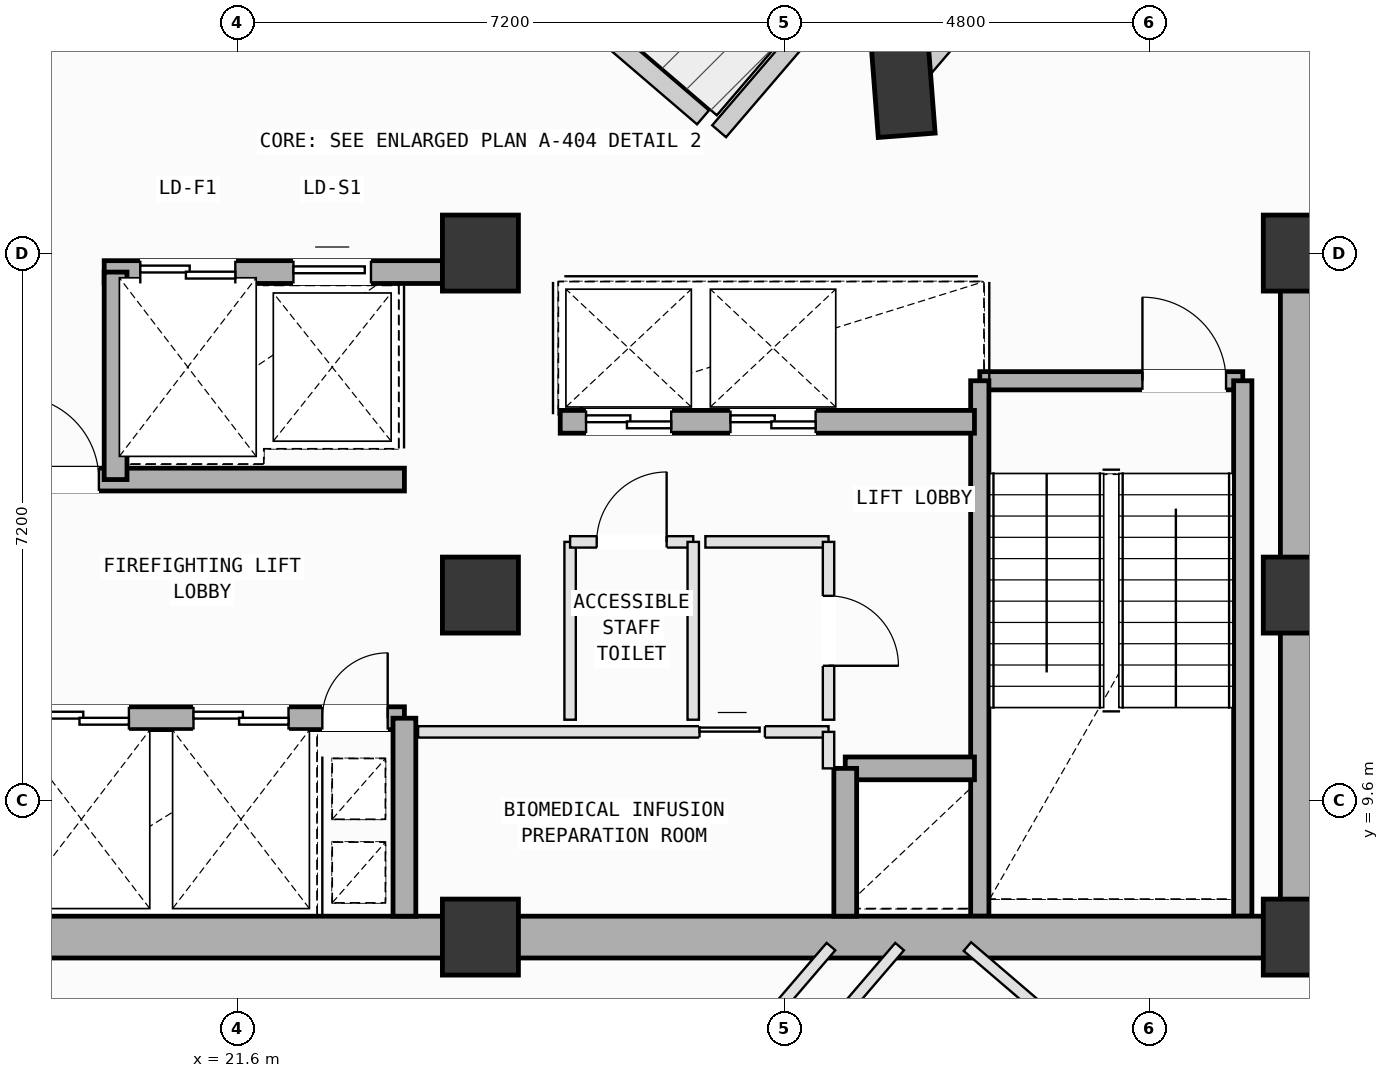
"""IFC4 building model, lengths in metres.
Left out: names, types, materials, properties, quantities, classifications, styles, units other than length and angle.
Written with IfcOpenShell. Run it as: python <this file> out.ifc"""

import sys

from ifc_helpers import new_model, si_unit, direction, frame, frame_2d, origin, origin_2d, place, context, subcontext, project, spatial, rectangle, extrude, element, fill, save


model = new_model("IFC4")
c1 = context("Model", 3, precision=1e-05, world=origin(), true_north=direction((0.0, 1.0)))
c2 = subcontext(c1, "Body", "Model", "MODEL_VIEW")
j1 = project(units=[si_unit("LENGTHUNIT", "METRE"), si_unit("PLANEANGLEUNIT", "RADIAN")], contexts=[c1])
p1 = place(None, origin())
s1 = spatial("IfcSite", under=j1, at=p1, CompositionType="ELEMENT")
p2 = place(p1, origin())
s2 = spatial("IfcBuilding", under=s1, at=p2, CompositionType="ELEMENT")
p3 = place(p2, frame((0.0, 0.0, 235.2)))
s3 = spatial("IfcBuildingStorey", under=s2, at=p3, CompositionType="ELEMENT", Elevation=235.2)
for number, where, z_axis, x_axis in (
    (1, (24.8, 7.8, 0.0), (0.0, 0.0, 1.0), (1.0, 0.0, 0.0)),
    (2, (24.8, 12.3, 0.0), (0.0, 0.0, 1.0), (1.0, 0.0, 0.0)),
    (3, (24.8, 16.8, 0.0), (0.0, 0.0, 1.0), (1.0, 0.0, 0.0)),
    (4, (35.6, 7.8, 0.0), (0.0, 0.0, 1.0), (1.0, 0.0, 0.0)),
    (5, (35.6, 12.3, 0.0), (0.0, 0.0, 1.0), (1.0, 0.0, 0.0)),
    (6, (35.6, 16.8, 0.0), (0.0, 0.0, 1.0), (1.0, 0.0, 0.0)),
):
    element("IfcColumn", number, at=place(p3, frame(where, z_axis=z_axis, x_axis=x_axis)), inside=s3, PredefinedType="COLUMN", context=c2, shape_type="SweptSolid", body=[
        extrude(rectangle(XDim=1.0, YDim=1.0, at=origin_2d()), origin(), (0.0, 0.0, 1.0), 4.0),
    ])
p4 = place(p3, frame((30.363, 18.948, 0.002), z_axis=(0.024365965773, -0.013251665596, 0.999615272528), x_axis=(-0.912212011302, 0.408784133134, 0.027654636777)))
e7 = element("IfcColumn", 7, at=p4, inside=s3, PredefinedType="COLUMN", context=c2, shape_type="SweptSolid", body=[
    extrude(rectangle(XDim=1.2, YDim=0.75, at=origin_2d()), origin(), (0.0, 0.0, 1.0), 3.998),
])
p5 = place(p3, frame((22.444, 23.115, 0.0), z_axis=(0.0, 0.0, 1.0), x_axis=(0.759271458892, -0.650774040442, 0.0)))
e8 = element("IfcWall", 8, at=p5, inside=s3, PredefinedType="SOLIDWALL", context=c2, shape_type="SweptSolid", body=[
    extrude(rectangle(XDim=6.96, YDim=0.24, at=frame_2d((3.48, 0.0))), origin(), (0.0, 0.0, 1.0), 3.265),
])
p6 = place(p5, frame((3.152, 0.0, 0.0)))
e9 = element("IfcOpeningElement", 9, at=p6, cuts=e8, PredefinedType="OPENING", context=c2, shape_type="SweptSolid", body=[
    extrude(rectangle(XDim=1.1, YDim=2.15, at=frame_2d((0.55, 1.075))), frame((0.0, 0.13, 0.0), z_axis=(0.0, -1.0, 0.0), x_axis=(1.0, 0.0, 0.0)), (0.0, 0.0, 1.0), 0.26),
])
p7 = place(p3, frame((27.941, 18.403, 0.0), z_axis=(0.0, 0.0, 1.0), x_axis=(0.650775288898, 0.759270388833, 0.0)))
e10 = element("IfcWall", 10, at=p7, inside=s3, PredefinedType="SOLIDWALL", context=c2, shape_type="SweptSolid", body=[
    extrude(rectangle(XDim=2.5, YDim=0.24, at=frame_2d((1.25, 0.0))), origin(), (0.0, 0.0, 1.0), 3.265),
])
p8 = place(p3, frame((30.626, 19.256, 0.0), z_axis=(0.0, 0.0, 1.0), x_axis=(0.650768519131, 0.75927619119, 0.0)))
e11 = element("IfcWall", 11, at=p8, inside=s3, PredefinedType="SOLIDWALL", context=c2, shape_type="SweptSolid", body=[
    extrude(rectangle(XDim=6.158, YDim=0.28, at=frame_2d((3.079, 0.0))), origin(), (0.0, 0.0, 1.0), 3.265),
])
p9 = place(p8, frame((3.357, 0.0, 0.75)))
e12 = element("IfcOpeningElement", 12, at=p9, cuts=e11, PredefinedType="OPENING", context=c2, shape_type="SweptSolid", body=[
    extrude(rectangle(XDim=2.0, YDim=1.95, at=frame_2d((1.0, 0.975))), frame((0.0, 0.15, 0.0), z_axis=(0.0, -1.0, 0.0), x_axis=(1.0, 0.0, 0.0)), (0.0, 0.0, 1.0), 0.3),
])
p10 = place(p3, frame((31.37, 15.12, 0.0), z_axis=(0.0, 0.0, 1.0), x_axis=(1.0, 0.0, 0.0)))
e13 = element("IfcWall", 13, at=p10, inside=s3, PredefinedType="SOLIDWALL", context=c2, shape_type="SweptSolid", body=[
    extrude(rectangle(XDim=3.46, YDim=0.24, at=frame_2d((1.73, 0.0))), origin(), (0.0, 0.0, 1.0), 3.78),
])
p11 = place(p10, frame((2.14, 0.0, 0.0)))
e14 = element("IfcOpeningElement", 14, at=p11, cuts=e13, PredefinedType="OPENING", context=c2, shape_type="SweptSolid", body=[
    extrude(rectangle(XDim=1.1, YDim=2.15, at=frame_2d((0.55, 1.075))), frame((0.0, 0.13, 0.0), z_axis=(0.0, -1.0, 0.0), x_axis=(1.0, 0.0, 0.0)), (0.0, 0.0, 1.0), 0.26),
])
for number, where, z_axis, x_axis in (
    (15, (34.83, 15.12, 0.0), (0.0, 0.0, 1.0), (0.0, -1.0, 0.0)),
    (16, (31.37, 8.075, 0.0), (0.0, 0.0, 1.0), (0.0, 1.0, 0.0)),
):
    element("IfcWall", number, at=place(p3, frame(where, z_axis=z_axis, x_axis=x_axis)), inside=s3, PredefinedType="SOLIDWALL", context=c2, shape_type="SweptSolid", body=[
        extrude(rectangle(XDim=7.045, YDim=0.24, at=frame_2d((3.522, 0.0))), origin(), (0.0, 0.0, 1.0), 3.78),
    ])
for number, where, z_axis, x_axis in (
    (17, (14.0, 7.8, 0.0), (0.0, 0.0, 1.0), (1.0, 0.0, 0.0)),
    (18, (24.8, 7.8, 0.0), (0.0, 0.0, 1.0), (1.0, 0.0, 0.0)),
):
    element("IfcWall", number, at=place(p3, frame(where, z_axis=z_axis, x_axis=x_axis)), inside=s3, PredefinedType="SHEAR", context=c2, shape_type="SweptSolid", body=[
        extrude(rectangle(XDim=10.8, YDim=0.55, at=frame_2d((5.4, 0.0))), origin(), (0.0, 0.0, 1.0), 3.78),
    ])
p12 = place(p3, frame((35.6, 7.8, 0.0), z_axis=(0.0, 0.0, 1.0), x_axis=(0.0, 1.0, 0.0)))
e19 = element("IfcWall", 19, at=p12, inside=s3, PredefinedType="SHEAR", context=c2, shape_type="SweptSolid", body=[
    extrude(rectangle(XDim=9.0, YDim=0.55, at=frame_2d((4.5, 0.0))), origin(), (0.0, 0.0, 1.0), 3.78),
])
p13 = place(p3, frame((19.85, 16.55, 0.0), z_axis=(0.0, 0.0, 1.0), x_axis=(1.0, 0.0, 0.0)))
e20 = element("IfcWall", 20, at=p13, inside=s3, PredefinedType="SOLIDWALL", context=c2, shape_type="SweptSolid", body=[
    extrude(rectangle(XDim=4.45, YDim=0.3, at=frame_2d((2.225, 0.0))), origin(), (0.0, 0.0, 1.0), 3.78),
])
p14 = place(p13, frame((0.475, 0.0, 0.0)))
e21 = element("IfcOpeningElement", 21, at=p14, cuts=e20, PredefinedType="OPENING", context=c2, shape_type="SweptSolid", body=[
    extrude(rectangle(XDim=1.25, YDim=2.18, at=frame_2d((0.625, 1.09))), frame((0.0, 0.16, 0.0), z_axis=(0.0, -1.0, 0.0), x_axis=(1.0, 0.0, 0.0)), (0.0, 0.0, 1.0), 0.32),
])
p15 = place(p13, frame((2.49, 0.0, 0.0)))
e22 = element("IfcOpeningElement", 22, at=p15, cuts=e20, PredefinedType="OPENING", context=c2, shape_type="SweptSolid", body=[
    extrude(rectangle(XDim=1.02, YDim=2.12, at=frame_2d((0.51, 1.06))), frame((0.0, 0.16, 0.0), z_axis=(0.0, -1.0, 0.0), x_axis=(1.0, 0.0, 0.0)), (0.0, 0.0, 1.0), 0.32),
])
p16 = place(p3, frame((18.5, 10.68, 0.0), z_axis=(0.0, 0.0, 1.0), x_axis=(1.0, 0.0, 0.0)))
e23 = element("IfcWall", 23, at=p16, inside=s3, PredefinedType="SOLIDWALL", context=c2, shape_type="SweptSolid", body=[
    extrude(rectangle(XDim=5.3, YDim=0.3, at=frame_2d((2.65, 0.0))), origin(), (0.0, 0.0, 1.0), 3.78),
])
p17 = place(p16, frame((4.22, 0.0, 0.0)))
e24 = element("IfcOpeningElement", 24, at=p17, cuts=e23, PredefinedType="OPENING", context=c2, shape_type="SweptSolid", body=[
    extrude(rectangle(XDim=0.86, YDim=2.06, at=frame_2d((0.43, 1.03))), frame((0.0, 0.16, 0.0), z_axis=(0.0, -1.0, 0.0), x_axis=(1.0, 0.0, 0.0)), (0.0, 0.0, 1.0), 0.32),
])
p18 = place(p16, frame((0.425, 0.0, 0.0)))
e25 = element("IfcOpeningElement", 25, at=p18, cuts=e23, PredefinedType="OPENING", context=c2, shape_type="SweptSolid", body=[
    extrude(rectangle(XDim=1.25, YDim=2.18, at=frame_2d((0.625, 1.09))), frame((0.0, 0.16, 0.0), z_axis=(0.0, -1.0, 0.0), x_axis=(1.0, 0.0, 0.0)), (0.0, 0.0, 1.0), 0.32),
])
p19 = place(p16, frame((2.525, 0.0, 0.0)))
e26 = element("IfcOpeningElement", 26, at=p19, cuts=e23, PredefinedType="OPENING", context=c2, shape_type="SweptSolid", body=[
    extrude(rectangle(XDim=1.25, YDim=2.18, at=frame_2d((0.625, 1.09))), frame((0.0, 0.16, 0.0), z_axis=(0.0, -1.0, 0.0), x_axis=(1.0, 0.0, 0.0)), (0.0, 0.0, 1.0), 0.32),
])
p20 = place(p3, frame((18.5, 13.82, 0.0), z_axis=(0.0, 0.0, 1.0), x_axis=(1.0, 0.0, 0.0)))
e27 = element("IfcWall", 27, at=p20, inside=s3, PredefinedType="SOLIDWALL", context=c2, shape_type="SweptSolid", body=[
    extrude(rectangle(XDim=5.3, YDim=0.3, at=frame_2d((2.65, 0.0))), origin(), (0.0, 0.0, 1.0), 3.78),
])
p21 = place(p20, frame((0.18, 0.0, 0.0)))
e28 = element("IfcOpeningElement", 28, at=p21, cuts=e27, PredefinedType="OPENING", context=c2, shape_type="SweptSolid", body=[
    extrude(rectangle(XDim=1.1, YDim=2.15, at=frame_2d((0.55, 1.075))), frame((0.0, 0.16, 0.0), z_axis=(0.0, -1.0, 0.0), x_axis=(1.0, 0.0, 0.0)), (0.0, 0.0, 1.0), 0.32),
])
p22 = place(p3, frame((23.8, 8.075, 0.0), z_axis=(0.0, 0.0, 1.0), x_axis=(0.0, 1.0, 0.0)))
e29 = element("IfcWall", 29, at=p22, inside=s3, PredefinedType="SOLIDWALL", context=c2, shape_type="SweptSolid", body=[
    extrude(rectangle(XDim=2.605, YDim=0.3, at=frame_2d((1.302, 0.0))), origin(), (0.0, 0.0, 1.0), 3.78),
])
p23 = place(p3, frame((20.0, 13.82, 0.0), z_axis=(0.0, 0.0, 1.0), x_axis=(0.0, 1.0, 0.0)))
e30 = element("IfcWall", 30, at=p23, inside=s3, PredefinedType="SOLIDWALL", context=c2, shape_type="SweptSolid", body=[
    extrude(rectangle(XDim=2.73, YDim=0.3, at=frame_2d((1.365, 0.0))), origin(), (0.0, 0.0, 1.0), 3.78),
])
p24 = place(p3, frame((29.6, 10.02, 0.0), z_axis=(0.0, 0.0, 1.0), x_axis=(1.0, 0.0, 0.0)))
e31 = element("IfcWall", 31, at=p24, inside=s3, PredefinedType="SOLIDWALL", context=c2, shape_type="SweptSolid", body=[
    extrude(rectangle(XDim=1.7, YDim=0.3, at=frame_2d((0.85, 0.0))), origin(), (0.0, 0.0, 1.0), 3.78),
])
p25 = place(p3, frame((29.6, 8.075, 0.0), z_axis=(0.0, 0.0, 1.0), x_axis=(0.0, 1.0, 0.0)))
e32 = element("IfcWall", 32, at=p25, inside=s3, PredefinedType="SOLIDWALL", context=c2, shape_type="SweptSolid", body=[
    extrude(rectangle(XDim=1.945, YDim=0.3, at=frame_2d((0.973, 0.0))), origin(), (0.0, 0.0, 1.0), 3.78),
])
p26 = place(p3, frame((25.85, 14.58, 0.0), z_axis=(0.0, 0.0, 1.0), x_axis=(1.0, 0.0, 0.0)))
e33 = element("IfcWall", 33, at=p26, inside=s3, PredefinedType="SOLIDWALL", context=c2, shape_type="SweptSolid", body=[
    extrude(rectangle(XDim=5.45, YDim=0.3, at=frame_2d((2.725, 0.0))), origin(), (0.0, 0.0, 1.0), 3.78),
])
p27 = place(p26, frame((0.34, 0.0, 0.0)))
e34 = element("IfcOpeningElement", 34, at=p27, cuts=e33, PredefinedType="OPENING", context=c2, shape_type="SweptSolid", body=[
    extrude(rectangle(XDim=1.12, YDim=2.15, at=frame_2d((0.56, 1.075))), frame((0.0, 0.16, 0.0), z_axis=(0.0, -1.0, 0.0), x_axis=(1.0, 0.0, 0.0)), (0.0, 0.0, 1.0), 0.32),
])
p28 = place(p26, frame((2.24, 0.0, 0.0)))
e35 = element("IfcOpeningElement", 35, at=p28, cuts=e33, PredefinedType="OPENING", context=c2, shape_type="SweptSolid", body=[
    extrude(rectangle(XDim=1.12, YDim=2.15, at=frame_2d((0.56, 1.075))), frame((0.0, 0.16, 0.0), z_axis=(0.0, -1.0, 0.0), x_axis=(1.0, 0.0, 0.0)), (0.0, 0.0, 1.0), 0.32),
])
p29 = place(p3, frame((23.98, 10.5, 0.0), z_axis=(0.0, 0.0, 1.0), x_axis=(1.0, 0.0, 0.0)))
e36 = element("IfcWall", 36, at=p29, inside=s3, PredefinedType="PARTITIONING", context=c2, shape_type="SweptSolid", body=[
    extrude(rectangle(XDim=5.4, YDim=0.15, at=frame_2d((2.7, 0.0))), origin(), (0.0, 0.0, 1.0), 3.78),
])
p30 = place(p29, frame((3.703, 0.0, 0.0)))
e37 = element("IfcOpeningElement", 37, at=p30, cuts=e36, PredefinedType="OPENING", context=c2, shape_type="SweptSolid", body=[
    extrude(rectangle(XDim=0.86, YDim=2.06, at=frame_2d((0.43, 1.03))), frame((0.0, 0.085, 0.0), z_axis=(0.0, -1.0, 0.0), x_axis=(1.0, 0.0, 0.0)), (0.0, 0.0, 1.0), 0.17),
])
p31 = place(p3, frame((29.38, 10.5, 0.0), z_axis=(0.0, 0.0, 1.0), x_axis=(0.0, -1.0, 0.0)))
e38 = element("IfcWall", 38, at=p31, inside=s3, PredefinedType="PARTITIONING", context=c2, shape_type="SweptSolid", body=[
    extrude(rectangle(XDim=0.48, YDim=0.15, at=frame_2d((0.24, 0.0))), origin(), (0.0, 0.0, 1.0), 3.78),
])
p32 = place(p3, frame((25.98, 10.66, 0.0), z_axis=(0.0, 0.0, 1.0), x_axis=(0.0, 1.0, 0.0)))
e39 = element("IfcWall", 39, at=p32, inside=s3, PredefinedType="PARTITIONING", context=c2, shape_type="SweptSolid", body=[
    extrude(rectangle(XDim=2.34, YDim=0.15, at=frame_2d((1.17, 0.0))), origin(), (0.0, 0.0, 1.0), 3.78),
])
p33 = place(p3, frame((25.98, 13.0, 0.0), z_axis=(0.0, 0.0, 1.0), x_axis=(1.0, 0.0, 0.0)))
e40 = element("IfcWall", 40, at=p33, inside=s3, PredefinedType="PARTITIONING", context=c2, shape_type="SweptSolid", body=[
    extrude(rectangle(XDim=1.62, YDim=0.15, at=frame_2d((0.81, 0.0))), origin(), (0.0, 0.0, 1.0), 3.78),
])
p34 = place(p33, frame((0.35, 0.0, 0.0)))
e41 = element("IfcOpeningElement", 41, at=p34, cuts=e40, PredefinedType="OPENING", context=c2, shape_type="SweptSolid", body=[
    extrude(rectangle(XDim=0.92, YDim=2.1, at=frame_2d((0.46, 1.05))), frame((0.0, 0.085, 0.0), z_axis=(0.0, -1.0, 0.0), x_axis=(1.0, 0.0, 0.0)), (0.0, 0.0, 1.0), 0.17),
])
p35 = place(p3, frame((27.6, 13.0, 0.0), z_axis=(0.0, 0.0, 1.0), x_axis=(0.0, -1.0, 0.0)))
e42 = element("IfcWall", 42, at=p35, inside=s3, PredefinedType="PARTITIONING", context=c2, shape_type="SweptSolid", body=[
    extrude(rectangle(XDim=2.34, YDim=0.15, at=frame_2d((1.17, 0.0))), origin(), (0.0, 0.0, 1.0), 3.78),
])
p36 = place(p3, frame((27.76, 13.0, 0.0), z_axis=(0.0, 0.0, 1.0), x_axis=(1.0, 0.0, 0.0)))
e43 = element("IfcWall", 43, at=p36, inside=s3, PredefinedType="PARTITIONING", context=c2, shape_type="SweptSolid", body=[
    extrude(rectangle(XDim=1.62, YDim=0.15, at=frame_2d((0.81, 0.0))), origin(), (0.0, 0.0, 1.0), 3.78),
])
p37 = place(p3, frame((29.38, 13.0, 0.0), z_axis=(0.0, 0.0, 1.0), x_axis=(0.0, -1.0, 0.0)))
e44 = element("IfcWall", 44, at=p37, inside=s3, PredefinedType="PARTITIONING", context=c2, shape_type="SweptSolid", body=[
    extrude(rectangle(XDim=2.34, YDim=0.15, at=frame_2d((1.17, 0.0))), origin(), (0.0, 0.0, 1.0), 3.78),
])
p38 = place(p37, frame((0.71, 0.0, 0.0)))
e45 = element("IfcOpeningElement", 45, at=p38, cuts=e44, PredefinedType="OPENING", context=c2, shape_type="SweptSolid", body=[
    extrude(rectangle(XDim=0.92, YDim=2.1, at=frame_2d((0.46, 1.05))), frame((0.0, 0.085, 0.0), z_axis=(0.0, -1.0, 0.0), x_axis=(1.0, 0.0, 0.0)), (0.0, 0.0, 1.0), 0.17),
])
p39 = place(p3, frame((22.379, -1.584, 0.0), z_axis=(0.0, 0.0, 1.0), x_axis=(0.650778183547, 0.759267907803, 0.0)))
e46 = element("IfcWall", 46, at=p39, inside=s3, PredefinedType="PARTITIONING", context=c2, shape_type="SweptSolid", body=[
    extrude(rectangle(XDim=12.195, YDim=0.15, at=frame_2d((6.097, 0.0))), origin(), (0.0, 0.0, 1.0), 3.78),
])
p40 = place(p3, frame((31.207, 7.675, 0.0), z_axis=(0.0, 0.0, 1.0), x_axis=(0.759272325888, -0.650773028897, 0.0)))
e47 = element("IfcWall", 47, at=p40, inside=s3, PredefinedType="PARTITIONING", context=c2, shape_type="SweptSolid", body=[
    extrude(rectangle(XDim=13.152, YDim=0.15, at=frame_2d((6.576, 0.0))), origin(), (0.0, 0.0, 1.0), 3.78),
])
p41 = place(p40, frame((6.393, 0.0, 0.0)))
e48 = element("IfcOpeningElement", 48, at=p41, cuts=e47, PredefinedType="OPENING", context=c2, shape_type="SweptSolid", body=[
    extrude(rectangle(XDim=0.86, YDim=2.06, at=frame_2d((0.43, 1.03))), frame((0.0, 0.085, 0.0), z_axis=(0.0, -1.0, 0.0), x_axis=(1.0, 0.0, 0.0)), (0.0, 0.0, 1.0), 0.17),
])
p42 = place(p3, frame((35.6, 7.5, 0.0), z_axis=(0.0, 0.0, 1.0), x_axis=(1.0, 0.0, 0.0)))
e49 = element("IfcWall", 49, at=p42, inside=s3, PredefinedType="PARTITIONING", context=c2, shape_type="SweptSolid", body=[
    extrude(rectangle(XDim=0.55, YDim=0.15, at=frame_2d((0.275, 0.0))), origin(), (0.0, 0.0, 1.0), 3.78),
])
p43 = place(p3, frame((29.412, 7.675, 0.0), z_axis=(0.0, 0.0, 1.0), x_axis=(-0.65075326378, -0.759289266143, 0.0)))
e50 = element("IfcWall", 50, at=p43, inside=s3, PredefinedType="PARTITIONING", context=c2, shape_type="SweptSolid", body=[
    extrude(rectangle(XDim=11.607, YDim=0.15, at=frame_2d((5.803, 0.0))), origin(), (0.0, 0.0, 1.0), 3.78),
])
p44 = place(p11, origin())
e51 = element("IfcDoor", 51, at=p44, inside=s3, OperationType="SINGLE_SWING_LEFT", PredefinedType="DOOR", context=c2, shape_type="SweptSolid", body=[
    extrude(rectangle(XDim=1.1, YDim=2.15, at=frame_2d((0.55, 1.075))), frame((0.0, 0.025, 0.0), z_axis=(0.0, -1.0, 0.0), x_axis=(1.0, 0.0, 0.0)), (0.0, 0.0, 1.0), 0.05),
])
fill(e14, e51)
p45 = place(p17, origin())
e52 = element("IfcDoor", 52, at=p45, inside=s3, OperationType="SINGLE_SWING_RIGHT", PredefinedType="DOOR", context=c2, shape_type="SweptSolid", body=[
    extrude(rectangle(XDim=0.86, YDim=2.06, at=frame_2d((0.43, 1.03))), frame((0.0, 0.025, 0.0), z_axis=(0.0, -1.0, 0.0), x_axis=(1.0, 0.0, 0.0)), (0.0, 0.0, 1.0), 0.05),
])
fill(e24, e52)
p46 = place(p21, origin())
e53 = element("IfcDoor", 53, at=p46, inside=s3, OperationType="SINGLE_SWING_LEFT", PredefinedType="DOOR", context=c2, shape_type="SweptSolid", body=[
    extrude(rectangle(XDim=1.1, YDim=2.15, at=frame_2d((0.55, 1.075))), frame((0.0, 0.025, 0.0), z_axis=(0.0, -1.0, 0.0), x_axis=(1.0, 0.0, 0.0)), (0.0, 0.0, 1.0), 0.05),
])
fill(e28, e53)
p47 = place(p18, origin())
e54 = element("IfcDoor", 54, at=p47, inside=s3, OperationType="DOUBLE_DOOR_SLIDING", PredefinedType="DOOR", context=c2, shape_type="SweptSolid", body=[
    extrude(rectangle(XDim=1.25, YDim=2.18, at=frame_2d((0.625, 1.09))), frame((0.0, 0.025, 0.0), z_axis=(0.0, -1.0, 0.0), x_axis=(1.0, 0.0, 0.0)), (0.0, 0.0, 1.0), 0.05),
])
fill(e25, e54)
p48 = place(p19, origin())
e55 = element("IfcDoor", 55, at=p48, inside=s3, OperationType="DOUBLE_DOOR_SLIDING", PredefinedType="DOOR", context=c2, shape_type="SweptSolid", body=[
    extrude(rectangle(XDim=1.25, YDim=2.18, at=frame_2d((0.625, 1.09))), frame((0.0, 0.025, 0.0), z_axis=(0.0, -1.0, 0.0), x_axis=(1.0, 0.0, 0.0)), (0.0, 0.0, 1.0), 0.05),
])
fill(e26, e55)
p49 = place(p27, origin())
e56 = element("IfcDoor", 56, at=p49, inside=s3, OperationType="DOUBLE_DOOR_SLIDING", PredefinedType="DOOR", context=c2, shape_type="SweptSolid", body=[
    extrude(rectangle(XDim=1.12, YDim=2.15, at=frame_2d((0.56, 1.075))), frame((0.0, 0.025, 0.0), z_axis=(0.0, -1.0, 0.0), x_axis=(1.0, 0.0, 0.0)), (0.0, 0.0, 1.0), 0.05),
])
fill(e34, e56)
p50 = place(p28, origin())
e57 = element("IfcDoor", 57, at=p50, inside=s3, OperationType="DOUBLE_DOOR_SLIDING", PredefinedType="DOOR", context=c2, shape_type="SweptSolid", body=[
    extrude(rectangle(XDim=1.12, YDim=2.15, at=frame_2d((0.56, 1.075))), frame((0.0, 0.025, 0.0), z_axis=(0.0, -1.0, 0.0), x_axis=(1.0, 0.0, 0.0)), (0.0, 0.0, 1.0), 0.05),
])
fill(e35, e57)
p51 = place(p14, origin())
e58 = element("IfcDoor", 58, at=p51, inside=s3, OperationType="DOUBLE_DOOR_SLIDING", PredefinedType="DOOR", context=c2, shape_type="SweptSolid", body=[
    extrude(rectangle(XDim=1.25, YDim=2.18, at=frame_2d((0.625, 1.09))), frame((0.0, 0.025, 0.0), z_axis=(0.0, -1.0, 0.0), x_axis=(1.0, 0.0, 0.0)), (0.0, 0.0, 1.0), 0.05),
])
fill(e21, e58)
p52 = place(p15, origin())
e59 = element("IfcDoor", 59, at=p52, inside=s3, OperationType="SLIDING_TO_LEFT", PredefinedType="DOOR", context=c2, shape_type="SweptSolid", body=[
    extrude(rectangle(XDim=1.02, YDim=2.12, at=frame_2d((0.51, 1.06))), frame((0.0, 0.025, 0.0), z_axis=(0.0, -1.0, 0.0), x_axis=(1.0, 0.0, 0.0)), (0.0, 0.0, 1.0), 0.05),
])
fill(e22, e59)
p53 = place(p34, origin())
e60 = element("IfcDoor", 60, at=p53, inside=s3, OperationType="SINGLE_SWING_RIGHT", PredefinedType="DOOR", context=c2, shape_type="SweptSolid", body=[
    extrude(rectangle(XDim=0.92, YDim=2.1, at=frame_2d((0.46, 1.05))), frame((0.0, 0.025, 0.0), z_axis=(0.0, -1.0, 0.0), x_axis=(1.0, 0.0, 0.0)), (0.0, 0.0, 1.0), 0.05),
])
fill(e41, e60)
p54 = place(p38, origin())
e61 = element("IfcDoor", 61, at=p54, inside=s3, OperationType="SINGLE_SWING_RIGHT", PredefinedType="DOOR", context=c2, shape_type="SweptSolid", body=[
    extrude(rectangle(XDim=0.92, YDim=2.1, at=frame_2d((0.46, 1.05))), frame((0.0, 0.025, 0.0), z_axis=(0.0, -1.0, 0.0), x_axis=(1.0, 0.0, 0.0)), (0.0, 0.0, 1.0), 0.05),
])
fill(e45, e61)
p55 = place(p30, origin())
e62 = element("IfcDoor", 62, at=p55, inside=s3, OperationType="SLIDING_TO_LEFT", PredefinedType="DOOR", context=c2, shape_type="SweptSolid", body=[
    extrude(rectangle(XDim=0.86, YDim=2.06, at=frame_2d((0.43, 1.03))), frame((0.0, 0.025, 0.0), z_axis=(0.0, -1.0, 0.0), x_axis=(1.0, 0.0, 0.0)), (0.0, 0.0, 1.0), 0.05),
])
fill(e37, e62)
save(model, sys.argv[1])
